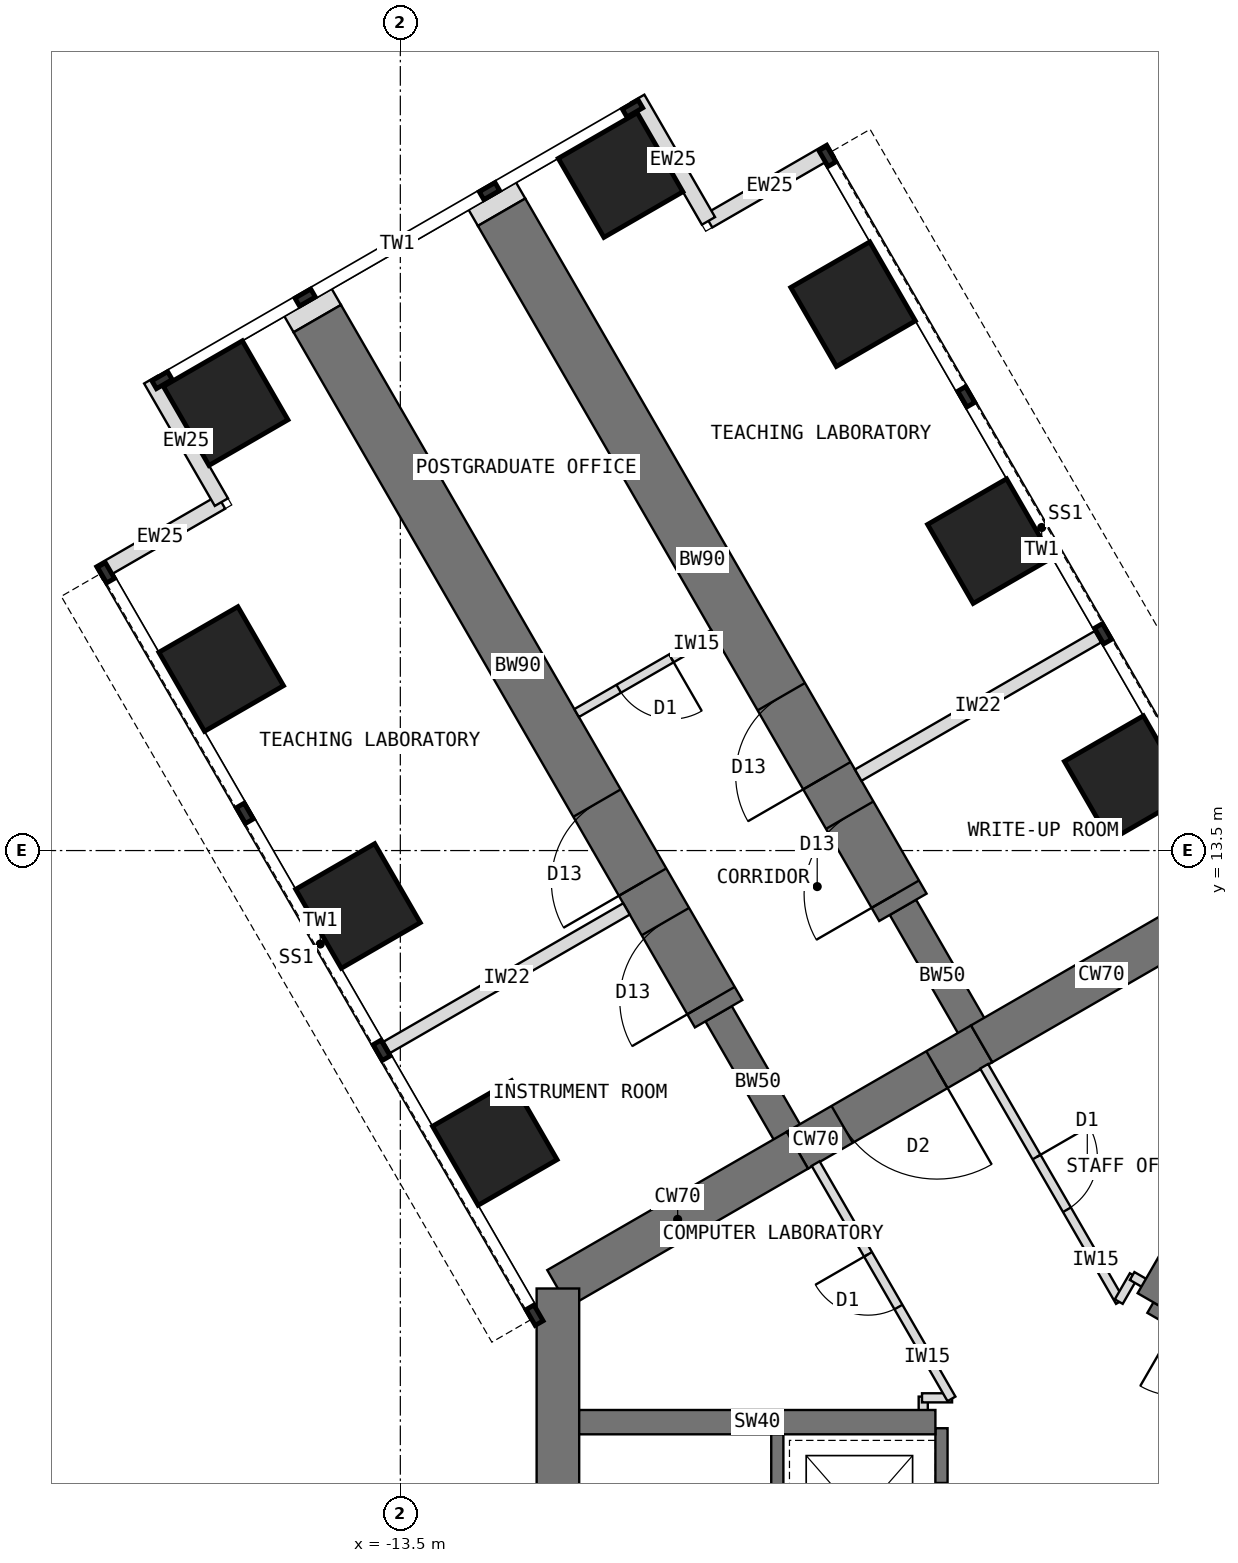
"""IFC4 building model, lengths in metres.
Left out: names, types, materials, properties, quantities, classifications, styles, units other than length and angle.
Written with IfcOpenShell. Run it as: python <this file> out.ifc"""

import sys

from ifc_helpers import new_model, si_unit, direction, frame, frame_2d, origin, origin_2d, place, context, subcontext, project, spatial, rectangle, extrude, element, fill, save


model = new_model("IFC4")
c1 = context("Model", 3, precision=1e-05, world=origin(), true_north=direction((0.0, 1.0)))
c2 = subcontext(c1, "Body", "Model", "MODEL_VIEW")
j1 = project(units=[si_unit("LENGTHUNIT", "METRE"), si_unit("PLANEANGLEUNIT", "RADIAN")], contexts=[c1])
p1 = place(None, origin())
s1 = spatial("IfcSite", under=j1, at=p1, CompositionType="ELEMENT")
p2 = place(p1, origin())
s2 = spatial("IfcBuilding", under=s1, at=p2, CompositionType="ELEMENT")
p3 = place(p2, frame((0.0, 0.0, 28.5)))
s3 = spatial("IfcBuildingStorey", under=s2, at=p3, CompositionType="ELEMENT", Elevation=28.5)
p4 = place(p3, frame((0.0, 12.596, 0.0), z_axis=(0.0, 0.0, 1.0), x_axis=(-0.866011268655, -0.500024481964, 0.0)))
e1 = element("IfcWall", 1, at=p4, inside=s3, PredefinedType="SHEAR", context=c2, shape_type="SweptSolid", body=[
    extrude(rectangle(XDim=4.548, YDim=0.7, at=frame_2d((2.274, 0.0))), origin(), (0.0, 0.0, 1.0), 4.0),
])
p5 = place(p3, frame((-3.939, 10.322, 0.0), z_axis=(0.0, 0.0, 1.0), x_axis=(-0.866019471182, -0.500010275428, 0.0)))
e2 = element("IfcWall", 2, at=p5, inside=s3, PredefinedType="SHEAR", context=c2, shape_type="SweptSolid", body=[
    extrude(rectangle(XDim=3.5, YDim=0.7, at=frame_2d((1.75, 0.0))), origin(), (0.0, 0.0, 1.0), 4.0),
])
p6 = place(p5, frame((0.85, 0.0, 0.0)))
e3 = element("IfcOpeningElement", 3, at=p6, cuts=e2, PredefinedType="OPENING", context=c2, shape_type="SweptSolid", body=[
    extrude(rectangle(XDim=1.8, YDim=2.1, at=frame_2d((0.9, 1.05))), frame((0.0, 0.36, 0.0), z_axis=(0.0, -1.0, 0.0), x_axis=(1.0, 0.0, 0.0)), (0.0, 0.0, 1.0), 0.72),
])
p7 = place(p3, frame((-6.97, 8.572, 0.0), z_axis=(0.0, 0.0, 1.0), x_axis=(-0.866034513004, -0.499984222037, 0.0)))
e4 = element("IfcWall", 4, at=p7, inside=s3, PredefinedType="SHEAR", context=c2, shape_type="SweptSolid", body=[
    extrude(rectangle(XDim=4.548, YDim=0.7, at=frame_2d((2.274, 0.0))), origin(), (0.0, 0.0, 1.0), 4.0),
])
p8 = place(p3, frame((-10.908, 6.298, 0.0), z_axis=(0.0, 0.0, 1.0), x_axis=(0.0, -1.0, 0.0)))
e5 = element("IfcWall", 5, at=p8, inside=s3, PredefinedType="SHEAR", context=c2, shape_type="SweptSolid", body=[
    extrude(rectangle(XDim=12.596, YDim=0.7, at=frame_2d((6.298, 0.0))), origin(), (0.0, 0.0, 1.0), 4.0),
])
p9 = place(p3, frame((-6.97, 8.572, 0.0), z_axis=(0.0, 0.0, 1.0), x_axis=(-0.499988811324, 0.866031863473, 0.0)))
e6 = element("IfcWall", 6, at=p9, inside=s3, PredefinedType="SHEAR", context=c2, shape_type="SweptSolid", body=[
    extrude(rectangle(XDim=2.592, YDim=0.5, at=frame_2d((1.296, 0.0))), origin(), (0.0, 0.0, 1.0), 4.0),
])
p10 = place(p3, frame((-8.266, 10.816, 0.0), z_axis=(0.0, 0.0, 1.0), x_axis=(-0.499996231654, 0.866027579429, 0.0)))
e7 = element("IfcWall", 7, at=p10, inside=s3, PredefinedType="SHEAR", context=c2, shape_type="SweptSolid", body=[
    extrude(rectangle(XDim=13.2, YDim=0.9, at=frame_2d((6.6, 0.0))), origin(), (0.0, 0.0, 1.0), 4.0),
])
p11 = place(p10, frame((0.25, 0.0, 0.0)))
e8 = element("IfcOpeningElement", 8, at=p11, cuts=e7, PredefinedType="OPENING", context=c2, shape_type="SweptSolid", body=[
    extrude(rectangle(XDim=1.5, YDim=2.1, at=frame_2d((0.75, 1.05))), frame((0.0, 0.46, 0.0), z_axis=(0.0, -1.0, 0.0), x_axis=(1.0, 0.0, 0.0)), (0.0, 0.0, 1.0), 0.92),
])
p12 = place(p10, frame((2.5, 0.0, 0.0)))
e9 = element("IfcOpeningElement", 9, at=p12, cuts=e7, PredefinedType="OPENING", context=c2, shape_type="SweptSolid", body=[
    extrude(rectangle(XDim=1.5, YDim=2.1, at=frame_2d((0.75, 1.05))), frame((0.0, 0.46, 0.0), z_axis=(0.0, -1.0, 0.0), x_axis=(1.0, 0.0, 0.0)), (0.0, 0.0, 1.0), 0.92),
])
p13 = place(p3, frame((-3.939, 10.322, 0.0), z_axis=(0.0, 0.0, 1.0), x_axis=(-0.499918158782, 0.866072649678, 0.0)))
e10 = element("IfcWall", 10, at=p13, inside=s3, PredefinedType="SHEAR", context=c2, shape_type="SweptSolid", body=[
    extrude(rectangle(XDim=2.592, YDim=0.5, at=frame_2d((1.296, 0.0))), origin(), (0.0, 0.0, 1.0), 4.0),
])
p14 = place(p3, frame((-5.234, 12.566, 0.0), z_axis=(0.0, 0.0, 1.0), x_axis=(-0.500010103361, 0.866019570528, 0.0)))
e11 = element("IfcWall", 11, at=p14, inside=s3, PredefinedType="SHEAR", context=c2, shape_type="SweptSolid", body=[
    extrude(rectangle(XDim=13.2, YDim=0.9, at=frame_2d((6.6, 0.0))), origin(), (0.0, 0.0, 1.0), 4.0),
])
p15 = place(p14, frame((0.25, 0.0, 0.0)))
e12 = element("IfcOpeningElement", 12, at=p15, cuts=e11, PredefinedType="OPENING", context=c2, shape_type="SweptSolid", body=[
    extrude(rectangle(XDim=1.5, YDim=2.1, at=frame_2d((0.75, 1.05))), frame((0.0, 0.46, 0.0), z_axis=(0.0, -1.0, 0.0), x_axis=(1.0, 0.0, 0.0)), (0.0, 0.0, 1.0), 0.92),
])
p16 = place(p14, frame((2.5, 0.0, 0.0)))
e13 = element("IfcOpeningElement", 13, at=p16, cuts=e11, PredefinedType="OPENING", context=c2, shape_type="SweptSolid", body=[
    extrude(rectangle(XDim=1.5, YDim=2.1, at=frame_2d((0.75, 1.05))), frame((0.0, 0.46, 0.0), z_axis=(0.0, -1.0, 0.0), x_axis=(1.0, 0.0, 0.0)), (0.0, 0.0, 1.0), 0.92),
])
for number, where, z_axis, x_axis in (
    (14, (-11.946, 8.691, 0.0), (0.0, 0.0, 1.0), (0.866, 0.5, 0.0)),
    (15, (-1.554, 14.691, 0.0), (0.0, 0.0, 1.0), (0.866, 0.5, 0.0)),
    (16, (-14.196, 12.588, 0.0), (0.0, 0.0, 1.0), (0.866, 0.5, 0.0)),
    (17, (-3.804, 18.588, 0.0), (0.0, 0.0, 1.0), (0.866, 0.5, 0.0)),
    (18, (-16.446, 16.486, 0.0), (0.0, 0.0, 1.0), (0.866, 0.5, 0.0)),
    (19, (-6.054, 22.486, 0.0), (0.0, 0.0, 1.0), (0.866, 0.5, 0.0)),
    (20, (-16.373, 20.858, 0.0), (0.0, 0.0, 1.0), (0.866, 0.5, 0.0)),
    (21, (-9.877, 24.608, 0.0), (0.0, 0.0, 1.0), (0.866, 0.5, 0.0)),
):
    element("IfcColumn", number, at=place(p3, frame(where, z_axis=z_axis, x_axis=x_axis)), inside=s3, PredefinedType="COLUMN", context=c2, shape_type="SweptSolid", body=[
        extrude(rectangle(XDim=1.5, YDim=1.5, at=origin_2d()), origin(), (0.0, 0.0, 1.0), 4.0),
    ])
for number, where, z_axis, x_axis in (
    (22, (-18.456, 18.067, 0.0), (0.0, 0.0, 1.0), (0.866, 0.5, 0.0)),
    (23, (-16.443, 19.23, 0.0), (0.0, 0.0, 1.0), (-0.5, 0.866, 0.0)),
    (24, (-6.419, 25.017, 0.0), (0.0, 0.0, 1.0), (-0.866, -0.5, 0.0)),
    (25, (-8.432, 23.855, 0.0), (0.0, 0.0, 1.0), (-0.5, 0.866, 0.0)),
):
    element("IfcWall", number, at=place(p3, frame(where, z_axis=z_axis, x_axis=x_axis)), inside=s3, PredefinedType="STANDARD", context=c2, shape_type="SweptSolid", body=[
        extrude(rectangle(XDim=2.325, YDim=0.25, at=frame_2d((1.163, 0.0))), origin(), (0.0, 0.0, 1.0), 3.8),
    ])
for number, where, z_axis, x_axis in (
    (26, (-14.865, 22.248, 0.0), (0.0, 0.0, 1.0), (-0.5, 0.866, 0.0)),
    (27, (-11.834, 23.998, 0.0), (0.0, 0.0, 1.0), (-0.5, 0.866, 0.0)),
):
    element("IfcWall", number, at=place(p3, frame(where, z_axis=z_axis, x_axis=x_axis)), inside=s3, PredefinedType="PARTITIONING", context=c2, shape_type="SweptSolid", body=[
        extrude(rectangle(XDim=0.31, YDim=0.9, at=frame_2d((0.155, 0.0))), origin(), (0.0, 0.0, 1.0), 3.8),
    ])
p17 = place(p3, frame((5.764, 1.984, 0.0), z_axis=(0.0, 0.0, 1.0), x_axis=(-0.866026010844, 0.49999894854, 0.0)))
e28 = element("IfcWall", 28, at=p17, inside=s3, PredefinedType="SHEAR", context=c2, shape_type="SweptSolid", body=[
    extrude(rectangle(XDim=8.0, YDim=0.2, at=frame_2d((4.0, 0.0))), origin(), (0.0, 0.0, 1.0), 4.0),
])
p18 = place(p17, frame((6.3, 0.0, 0.0)))
e29 = element("IfcOpeningElement", 29, at=p18, cuts=e28, PredefinedType="OPENING", context=c2, shape_type="SweptSolid", body=[
    extrude(rectangle(XDim=1.2, YDim=2.1, at=frame_2d((0.6, 1.05))), frame((0.0, 0.11, 0.0), z_axis=(0.0, -1.0, 0.0), x_axis=(1.0, 0.0, 0.0)), (0.0, 0.0, 1.0), 0.22),
])
p19 = place(p3, frame((-1.201, 6.12, 0.0), z_axis=(0.0, 0.0, 1.0), x_axis=(0.500002627198, 0.866023886965, 0.0)))
e30 = element("IfcWall", 30, at=p19, inside=s3, PredefinedType="SHEAR", context=c2, shape_type="SweptSolid", body=[
    extrude(rectangle(XDim=5.858, YDim=0.4, at=frame_2d((2.929, 0.0))), origin(), (0.0, 0.0, 1.0), 4.0),
])
p20 = place(p3, frame((-4.6, 4.0, 0.0), z_axis=(0.0, 0.0, 1.0), x_axis=(0.0, -1.0, 0.0)))
e31 = element("IfcWall", 31, at=p20, inside=s3, PredefinedType="SHEAR", context=c2, shape_type="SweptSolid", body=[
    extrude(rectangle(XDim=8.0, YDim=0.2, at=frame_2d((4.0, 0.0))), origin(), (0.0, 0.0, 1.0), 4.0),
])
p21 = place(p20, frame((6.3, 0.0, 0.0)))
e32 = element("IfcOpeningElement", 32, at=p21, cuts=e31, PredefinedType="OPENING", context=c2, shape_type="SweptSolid", body=[
    extrude(rectangle(XDim=1.2, YDim=2.1, at=frame_2d((0.6, 1.05))), frame((0.0, 0.11, 0.0), z_axis=(0.0, -1.0, 0.0), x_axis=(1.0, 0.0, 0.0)), (0.0, 0.0, 1.0), 0.22),
])
p22 = place(p20, frame((0.9, 0.0, 0.0)))
e33 = element("IfcOpeningElement", 33, at=p22, cuts=e31, PredefinedType="OPENING", context=c2, shape_type="SweptSolid", body=[
    extrude(rectangle(XDim=1.1, YDim=2.2, at=frame_2d((0.55, 1.1))), frame((0.0, 0.11, 0.0), z_axis=(0.0, -1.0, 0.0), x_axis=(1.0, 0.0, 0.0)), (0.0, 0.0, 1.0), 0.22),
])
p23 = place(p3, frame((-7.3, 4.0, 0.0), z_axis=(0.0, 0.0, 1.0), x_axis=(0.0, -1.0, 0.0)))
e34 = element("IfcWall", 34, at=p23, inside=s3, PredefinedType="SHEAR", context=c2, shape_type="SweptSolid", body=[
    extrude(rectangle(XDim=8.0, YDim=0.2, at=frame_2d((4.0, 0.0))), origin(), (0.0, 0.0, 1.0), 4.0),
])
p24 = place(p23, frame((6.7, 0.0, 0.0)))
e35 = element("IfcOpeningElement", 35, at=p24, cuts=e34, PredefinedType="OPENING", context=c2, shape_type="SweptSolid", body=[
    extrude(rectangle(XDim=1.1, YDim=2.1, at=frame_2d((0.55, 1.05))), frame((0.0, 0.11, 0.0), z_axis=(0.0, -1.0, 0.0), x_axis=(1.0, 0.0, 0.0)), (0.0, 0.0, 1.0), 0.22),
])
p25 = place(p3, frame((-4.7, 4.1, 0.0), z_axis=(0.0, 0.0, 1.0), x_axis=(-1.0, 0.0, 0.0)))
e36 = element("IfcWall", 36, at=p25, inside=s3, PredefinedType="SHEAR", context=c2, shape_type="SweptSolid", body=[
    extrude(rectangle(XDim=5.858, YDim=0.4, at=frame_2d((2.929, 0.0))), origin(), (0.0, 0.0, 1.0), 4.0),
])
for number, where, z_axis, x_axis in (
    (37, (-9.78, 12.54, 0.0), (0.0, 0.0, 1.0), (-0.866, -0.5, 0.0)),
    (38, (-5.97, 14.74, 0.0), (0.0, 0.0, 1.0), (0.866, 0.5, 0.0)),
):
    element("IfcWall", number, at=place(p3, frame(where, z_axis=z_axis, x_axis=x_axis)), inside=s3, PredefinedType="PARTITIONING", context=c2, shape_type="SweptSolid", body=[
        extrude(rectangle(XDim=4.55, YDim=0.215, at=frame_2d((2.275, 0.0))), origin(), (0.0, 0.0, 1.0), 3.8),
    ])
p26 = place(p3, frame((-4.9, 4.09, 0.0), z_axis=(0.0, 0.0, 1.0), x_axis=(0.0, 1.0, 0.0)))
e39 = element("IfcWall", 39, at=p26, inside=s3, PredefinedType="PARTITIONING", context=c2, shape_type="SweptSolid", body=[
    extrude(rectangle(XDim=0.43, YDim=0.15, at=frame_2d((0.215, 0.0))), origin(), (0.0, 0.0, 1.0), 3.8),
])
p27 = place(p3, frame((-4.92, 4.5, 0.0), z_axis=(0.0, 0.0, 1.0), x_axis=(1.0, 0.0, 0.0)))
e40 = element("IfcWall", 40, at=p27, inside=s3, PredefinedType="PARTITIONING", context=c2, shape_type="SweptSolid", body=[
    extrude(rectangle(XDim=0.494, YDim=0.15, at=frame_2d((0.247, 0.0))), origin(), (0.0, 0.0, 1.0), 3.8),
])
p28 = place(p3, frame((-4.436, 4.483, 0.0), z_axis=(0.0, 0.0, 1.0), x_axis=(-0.500017246033, 0.866015446554, 0.0)))
e41 = element("IfcWall", 41, at=p28, inside=s3, PredefinedType="PARTITIONING", context=c2, shape_type="SweptSolid", body=[
    extrude(rectangle(XDim=4.469, YDim=0.15, at=frame_2d((2.234, 0.0))), origin(), (0.0, 0.0, 1.0), 3.8),
])
p29 = place(p28, frame((1.744, 0.0, 0.0)))
e42 = element("IfcOpeningElement", 42, at=p29, cuts=e41, PredefinedType="OPENING", context=c2, shape_type="SweptSolid", body=[
    extrude(rectangle(XDim=1.0, YDim=2.1, at=frame_2d((0.5, 1.05))), frame((0.0, 0.085, 0.0), z_axis=(0.0, -1.0, 0.0), x_axis=(1.0, 0.0, 0.0)), (0.0, 0.0, 1.0), 0.17),
])
p30 = place(p3, frame((-3.898, 9.952, 0.0), z_axis=(0.0, 0.0, 1.0), x_axis=(0.499999927604, -0.866025445582, 0.0)))
e43 = element("IfcWall", 43, at=p30, inside=s3, PredefinedType="PARTITIONING", context=c2, shape_type="SweptSolid", body=[
    extrude(rectangle(XDim=4.468, YDim=0.15, at=frame_2d((2.234, 0.0))), origin(), (0.0, 0.0, 1.0), 3.8),
])
p31 = place(p30, frame((1.724, 0.0, 0.0)))
e44 = element("IfcOpeningElement", 44, at=p31, cuts=e43, PredefinedType="OPENING", context=c2, shape_type="SweptSolid", body=[
    extrude(rectangle(XDim=1.0, YDim=2.1, at=frame_2d((0.5, 1.05))), frame((0.0, 0.085, 0.0), z_axis=(0.0, -1.0, 0.0), x_axis=(1.0, 0.0, 0.0)), (0.0, 0.0, 1.0), 0.17),
])
p32 = place(p3, frame((-1.684, 6.083, 0.0), z_axis=(0.0, 0.0, 1.0), x_axis=(0.50033519877, 0.865831790172, 0.0)))
e45 = element("IfcWall", 45, at=p32, inside=s3, PredefinedType="PARTITIONING", context=c2, shape_type="SweptSolid", body=[
    extrude(rectangle(XDim=0.494, YDim=0.15, at=frame_2d((0.247, 0.0))), origin(), (0.0, 0.0, 1.0), 3.8),
])
p33 = place(p3, frame((-1.464, 6.503, 0.0), z_axis=(0.0, 0.0, 1.0), x_axis=(0.866138304741, -0.499804398801, 0.0)))
e46 = element("IfcWall", 46, at=p33, inside=s3, PredefinedType="PARTITIONING", context=c2, shape_type="SweptSolid", body=[
    extrude(rectangle(XDim=0.43, YDim=0.15, at=frame_2d((0.215, 0.0))), origin(), (0.0, 0.0, 1.0), 3.8),
])
p34 = place(p3, frame((-8.349, 17.061, 0.0), z_axis=(0.0, 0.0, 1.0), x_axis=(-0.866021400173, -0.500006934395, 0.0)))
e47 = element("IfcWall", 47, at=p34, inside=s3, PredefinedType="PARTITIONING", context=c2, shape_type="SweptSolid", body=[
    extrude(rectangle(XDim=2.6, YDim=0.15, at=frame_2d((1.3, 0.0))), origin(), (0.0, 0.0, 1.0), 3.8),
])
p35 = place(p34, frame((0.8, 0.0, 0.0)))
e48 = element("IfcOpeningElement", 48, at=p35, cuts=e47, PredefinedType="OPENING", context=c2, shape_type="SweptSolid", body=[
    extrude(rectangle(XDim=1.0, YDim=2.1, at=frame_2d((0.5, 1.05))), frame((0.0, 0.085, 0.0), z_axis=(0.0, -1.0, 0.0), x_axis=(1.0, 0.0, 0.0)), (0.0, 0.0, 1.0), 0.17),
])
p36 = place(p6, origin())
e49 = element("IfcDoor", 49, at=p36, inside=s3, OperationType="DOUBLE_DOOR_DOUBLE_SWING", PredefinedType="DOOR", context=c2, shape_type="SweptSolid", body=[
    extrude(rectangle(XDim=1.72, YDim=2.06, at=frame_2d((0.9, 1.03))), frame((0.0, 0.025, 0.0), z_axis=(0.0, -1.0, 0.0), x_axis=(1.0, 0.0, 0.0)), (0.0, 0.0, 1.0), 0.05),
    extrude(rectangle(XDim=0.04, YDim=2.1, at=frame_2d((0.02, 1.05))), frame((0.0, 0.35, 0.0), z_axis=(0.0, -1.0, 0.0), x_axis=(1.0, 0.0, 0.0)), (0.0, 0.0, 1.0), 0.699),
    extrude(rectangle(XDim=0.04, YDim=2.1, at=frame_2d((1.78, 1.05))), frame((0.0, 0.35, 0.0), z_axis=(0.0, -1.0, 0.0), x_axis=(1.0, 0.0, 0.0)), (0.0, 0.0, 1.0), 0.699),
    extrude(rectangle(XDim=1.72, YDim=0.04, at=frame_2d((0.9, 2.08))), frame((0.0, 0.35, 0.0), z_axis=(0.0, -1.0, 0.0), x_axis=(1.0, 0.0, 0.0)), (0.0, 0.0, 1.0), 0.699),
])
fill(e3, e49)
p37 = place(p31, origin())
e50 = element("IfcDoor", 50, at=p37, inside=s3, OperationType="SINGLE_SWING_LEFT", PredefinedType="DOOR", context=c2, shape_type="SweptSolid", body=[
    extrude(rectangle(XDim=1.0, YDim=2.1, at=frame_2d((0.5, 1.05))), frame((0.0, 0.025, 0.0), z_axis=(0.0, -1.0, 0.0), x_axis=(1.0, 0.0, 0.0)), (0.0, 0.0, 1.0), 0.05),
])
fill(e44, e50)
p38 = place(p29, origin())
e51 = element("IfcDoor", 51, at=p38, inside=s3, OperationType="SINGLE_SWING_RIGHT", PredefinedType="DOOR", context=c2, shape_type="SweptSolid", body=[
    extrude(rectangle(XDim=1.0, YDim=2.1, at=frame_2d((0.5, 1.05))), frame((0.0, 0.025, 0.0), z_axis=(0.0, -1.0, 0.0), x_axis=(1.0, 0.0, 0.0)), (0.0, 0.0, 1.0), 0.05),
])
fill(e42, e51)
p39 = place(p35, origin())
e52 = element("IfcDoor", 52, at=p39, inside=s3, OperationType="SINGLE_SWING_LEFT", PredefinedType="DOOR", context=c2, shape_type="SweptSolid", body=[
    extrude(rectangle(XDim=1.0, YDim=2.1, at=frame_2d((0.5, 1.05))), frame((0.0, 0.025, 0.0), z_axis=(0.0, -1.0, 0.0), x_axis=(1.0, 0.0, 0.0)), (0.0, 0.0, 1.0), 0.05),
])
fill(e48, e52)
p40 = place(p11, origin())
e53 = element("IfcDoor", 53, at=p40, inside=s3, OperationType="DOUBLE_DOOR_SINGLE_SWING", PredefinedType="DOOR", context=c2, shape_type="SweptSolid", body=[
    extrude(rectangle(XDim=1.42, YDim=2.06, at=frame_2d((0.75, 1.03))), frame((0.0, 0.025, 0.0), z_axis=(0.0, -1.0, 0.0), x_axis=(1.0, 0.0, 0.0)), (0.0, 0.0, 1.0), 0.05),
    extrude(rectangle(XDim=0.04, YDim=2.1, at=frame_2d((0.02, 1.05))), frame((0.0, 0.45, 0.0), z_axis=(0.0, -1.0, 0.0), x_axis=(1.0, 0.0, 0.0)), (0.0, 0.0, 1.0), 0.899),
    extrude(rectangle(XDim=0.04, YDim=2.1, at=frame_2d((1.48, 1.05))), frame((0.0, 0.45, 0.0), z_axis=(0.0, -1.0, 0.0), x_axis=(1.0, 0.0, 0.0)), (0.0, 0.0, 1.0), 0.899),
    extrude(rectangle(XDim=1.42, YDim=0.04, at=frame_2d((0.75, 2.08))), frame((0.0, 0.45, 0.0), z_axis=(0.0, -1.0, 0.0), x_axis=(1.0, 0.0, 0.0)), (0.0, 0.0, 1.0), 0.899),
])
fill(e8, e53)
p41 = place(p12, origin())
e54 = element("IfcDoor", 54, at=p41, inside=s3, OperationType="DOUBLE_DOOR_SINGLE_SWING", PredefinedType="DOOR", context=c2, shape_type="SweptSolid", body=[
    extrude(rectangle(XDim=1.42, YDim=2.06, at=frame_2d((0.75, 1.03))), frame((0.0, 0.025, 0.0), z_axis=(0.0, -1.0, 0.0), x_axis=(1.0, 0.0, 0.0)), (0.0, 0.0, 1.0), 0.05),
    extrude(rectangle(XDim=0.04, YDim=2.1, at=frame_2d((0.02, 1.05))), frame((0.0, 0.45, 0.0), z_axis=(0.0, -1.0, 0.0), x_axis=(1.0, 0.0, 0.0)), (0.0, 0.0, 1.0), 0.899),
    extrude(rectangle(XDim=0.04, YDim=2.1, at=frame_2d((1.48, 1.05))), frame((0.0, 0.45, 0.0), z_axis=(0.0, -1.0, 0.0), x_axis=(1.0, 0.0, 0.0)), (0.0, 0.0, 1.0), 0.899),
    extrude(rectangle(XDim=1.42, YDim=0.04, at=frame_2d((0.75, 2.08))), frame((0.0, 0.45, 0.0), z_axis=(0.0, -1.0, 0.0), x_axis=(1.0, 0.0, 0.0)), (0.0, 0.0, 1.0), 0.899),
])
fill(e9, e54)
p42 = place(p15, origin())
e55 = element("IfcDoor", 55, at=p42, inside=s3, OperationType="DOUBLE_DOOR_SINGLE_SWING", PredefinedType="DOOR", context=c2, shape_type="SweptSolid", body=[
    extrude(rectangle(XDim=1.42, YDim=2.06, at=frame_2d((0.75, 1.03))), frame((0.0, 0.025, 0.0), z_axis=(0.0, -1.0, 0.0), x_axis=(1.0, 0.0, 0.0)), (0.0, 0.0, 1.0), 0.05),
    extrude(rectangle(XDim=0.04, YDim=2.1, at=frame_2d((0.02, 1.05))), frame((0.0, 0.45, 0.0), z_axis=(0.0, -1.0, 0.0), x_axis=(1.0, 0.0, 0.0)), (0.0, 0.0, 1.0), 0.899),
    extrude(rectangle(XDim=0.04, YDim=2.1, at=frame_2d((1.48, 1.05))), frame((0.0, 0.45, 0.0), z_axis=(0.0, -1.0, 0.0), x_axis=(1.0, 0.0, 0.0)), (0.0, 0.0, 1.0), 0.899),
    extrude(rectangle(XDim=1.42, YDim=0.04, at=frame_2d((0.75, 2.08))), frame((0.0, 0.45, 0.0), z_axis=(0.0, -1.0, 0.0), x_axis=(1.0, 0.0, 0.0)), (0.0, 0.0, 1.0), 0.899),
])
fill(e12, e55)
p43 = place(p16, origin())
e56 = element("IfcDoor", 56, at=p43, inside=s3, OperationType="DOUBLE_DOOR_SINGLE_SWING", PredefinedType="DOOR", context=c2, shape_type="SweptSolid", body=[
    extrude(rectangle(XDim=1.42, YDim=2.06, at=frame_2d((0.75, 1.03))), frame((0.0, 0.025, 0.0), z_axis=(0.0, -1.0, 0.0), x_axis=(1.0, 0.0, 0.0)), (0.0, 0.0, 1.0), 0.05),
    extrude(rectangle(XDim=0.04, YDim=2.1, at=frame_2d((0.02, 1.05))), frame((0.0, 0.45, 0.0), z_axis=(0.0, -1.0, 0.0), x_axis=(1.0, 0.0, 0.0)), (0.0, 0.0, 1.0), 0.899),
    extrude(rectangle(XDim=0.04, YDim=2.1, at=frame_2d((1.48, 1.05))), frame((0.0, 0.45, 0.0), z_axis=(0.0, -1.0, 0.0), x_axis=(1.0, 0.0, 0.0)), (0.0, 0.0, 1.0), 0.899),
    extrude(rectangle(XDim=1.42, YDim=0.04, at=frame_2d((0.75, 2.08))), frame((0.0, 0.45, 0.0), z_axis=(0.0, -1.0, 0.0), x_axis=(1.0, 0.0, 0.0)), (0.0, 0.0, 1.0), 0.899),
])
fill(e13, e56)
save(model, sys.argv[1])
